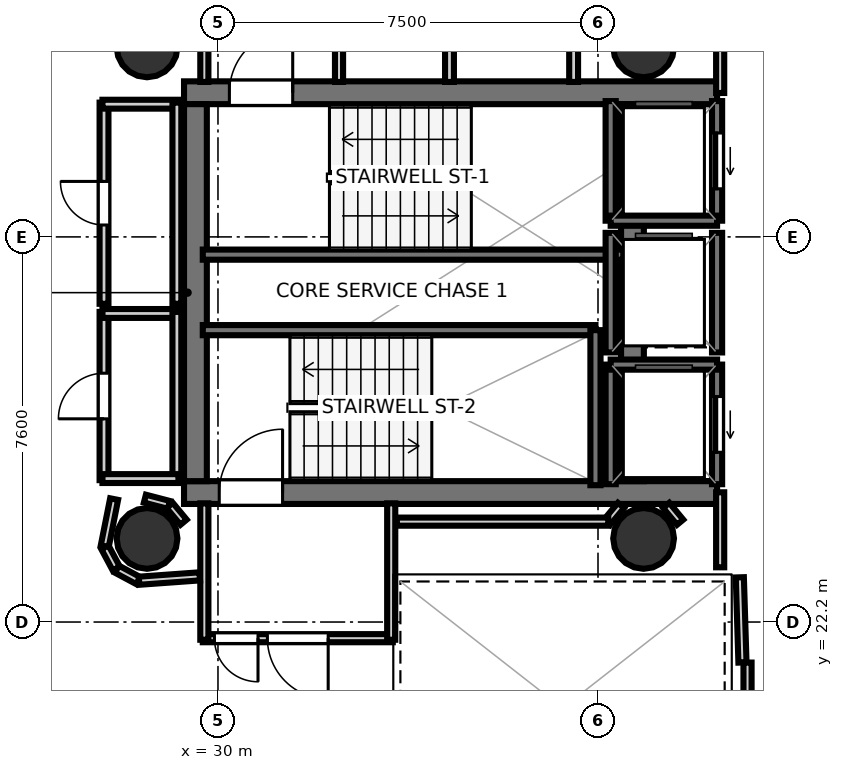
"""IFC4 building model, lengths in metres.
Left out: names, types, materials, properties, quantities, classifications, styles, units other than length and angle.
Written with IfcOpenShell. Run it as: python <this file> out.ifc"""

import sys

from ifc_helpers import new_model, si_unit, direction, frame, frame_2d, origin, origin_2d, place, context, subcontext, project, spatial, rectangle, hollow_circle, extrude, element, fill, save


model = new_model("IFC4")
c1 = context("Model", 3, precision=1e-05, world=origin(), true_north=direction((0.0, 1.0)))
c2 = subcontext(c1, "Body", "Model", "MODEL_VIEW")
j1 = project(units=[si_unit("LENGTHUNIT", "METRE"), si_unit("PLANEANGLEUNIT", "RADIAN")], contexts=[c1])
p1 = place(None, origin())
s1 = spatial("IfcSite", under=j1, at=p1, CompositionType="ELEMENT")
p2 = place(p1, origin())
s2 = spatial("IfcBuilding", under=s1, at=p2, CompositionType="ELEMENT")
p3 = place(p2, frame((0.0, 0.0, 189.2)))
s3 = spatial("IfcBuildingStorey", under=s2, at=p3, CompositionType="ELEMENT", Elevation=189.2)
p4 = place(p3, frame((29.33, 32.645, 0.0), z_axis=(0.0, 0.0, 1.0), x_axis=(1.0, 0.0, 0.0)))
e1 = element("IfcWall", 1, at=p4, inside=s3, PredefinedType="SHEAR", context=c2, shape_type="SweptSolid", body=[
    extrude(rectangle(XDim=10.52, YDim=0.45, at=frame_2d((5.26, 0.0))), origin(), (0.0, 0.0, 1.0), 3.52),
])
p5 = place(p4, frame((0.895, 0.0, 0.0)))
e2 = element("IfcOpeningElement", 2, at=p5, cuts=e1, PredefinedType="OPENING", context=c2, shape_type="SweptSolid", body=[
    extrude(rectangle(XDim=1.25, YDim=2.15, at=frame_2d((0.625, 1.075))), frame((0.0, 0.235, 0.0), z_axis=(0.0, -1.0, 0.0), x_axis=(1.0, 0.0, 0.0)), (0.0, 0.0, 1.0), 0.47),
])
p6 = place(p3, frame((29.33, 24.755, 0.0), z_axis=(0.0, 0.0, 1.0), x_axis=(1.0, 0.0, 0.0)))
e3 = element("IfcWall", 3, at=p6, inside=s3, PredefinedType="SHEAR", context=c2, shape_type="SweptSolid", body=[
    extrude(rectangle(XDim=10.52, YDim=0.45, at=frame_2d((5.26, 0.0))), origin(), (0.0, 0.0, 1.0), 3.52),
])
p7 = place(p6, frame((0.695, 0.0, 0.0)))
e4 = element("IfcOpeningElement", 4, at=p7, cuts=e3, PredefinedType="OPENING", context=c2, shape_type="SweptSolid", body=[
    extrude(rectangle(XDim=1.25, YDim=2.15, at=frame_2d((0.625, 1.075))), frame((0.0, 0.235, 0.0), z_axis=(0.0, -1.0, 0.0), x_axis=(1.0, 0.0, 0.0)), (0.0, 0.0, 1.0), 0.47),
])
for number, where, z_axis, x_axis in (
    (5, (29.555, 24.98, 0.0), (0.0, 0.0, 1.0), (0.0, 1.0, 0.0)),
    (6, (38.18, 24.98, 0.0), (0.0, 0.0, 1.0), (0.0, 1.0, 0.0)),
):
    element("IfcWall", number, at=place(p3, frame(where, z_axis=z_axis, x_axis=x_axis)), inside=s3, PredefinedType="SHEAR", context=c2, shape_type="SweptSolid", body=[
        extrude(rectangle(XDim=7.44, YDim=0.45, at=frame_2d((3.72, 0.0))), origin(), (0.0, 0.0, 1.0), 3.52),
    ])
for number, where, z_axis, x_axis in (
    (7, (28.6, 33.55, 0.0), (0.0, 0.0, 1.0), (1.0, 0.0, 0.0)),
    (8, (28.6, 23.85, 0.0), (0.0, 0.0, 1.0), (1.0, 0.0, 0.0)),
    (9, (38.4, 33.55, 0.0), (0.0, 0.0, 1.0), (1.0, 0.0, 0.0)),
    (10, (38.4, 23.85, 0.0), (0.0, 0.0, 1.0), (1.0, 0.0, 0.0)),
):
    element("IfcColumn", number, at=place(p3, frame(where, z_axis=z_axis, x_axis=x_axis)), inside=s3, PredefinedType="COLUMN", context=c2, shape_type="SweptSolid", body=[
        extrude(hollow_circle(Radius=0.6, WallThickness=0.03, at=origin_2d()), origin(), (0.0, 0.0, 1.0), 3.7),
    ])
p8 = place(p3, frame((29.7, 29.45, 0.0), z_axis=(0.0, 0.0, 1.0), x_axis=(1.0, 0.0, 0.0)))
e11 = element("IfcWall", 11, at=p8, inside=s3, PredefinedType="SOLIDWALL", context=c2, shape_type="SweptSolid", body=[
    extrude(rectangle(XDim=8.3, YDim=0.2, at=frame_2d((4.15, 0.0))), origin(), (0.0, 0.0, 1.0), 3.52),
])
p9 = place(p3, frame((29.7, 27.96, 0.0), z_axis=(0.0, 0.0, 1.0), x_axis=(1.0, 0.0, 0.0)))
e12 = element("IfcWall", 12, at=p9, inside=s3, PredefinedType="SOLIDWALL", context=c2, shape_type="SweptSolid", body=[
    extrude(rectangle(XDim=7.75, YDim=0.2, at=frame_2d((3.875, 0.0))), origin(), (0.0, 0.0, 1.0), 3.52),
])
p10 = place(p3, frame((37.45, 24.9, 0.0), z_axis=(0.0, 0.0, 1.0), x_axis=(0.0, 1.0, 0.0)))
e13 = element("IfcWall", 13, at=p10, inside=s3, PredefinedType="SOLIDWALL", context=c2, shape_type="SweptSolid", body=[
    extrude(rectangle(XDim=3.06, YDim=0.2, at=frame_2d((1.53, 0.0))), origin(), (0.0, 0.0, 1.0), 3.52),
])
p11 = place(p3, frame((39.85, 30.12, 0.0), z_axis=(0.0, 0.0, 1.0), x_axis=(0.0, 1.0, 0.0)))
e14 = element("IfcWall", 14, at=p11, inside=s3, PredefinedType="SOLIDWALL", context=c2, shape_type="SweptSolid", body=[
    extrude(rectangle(XDim=2.36, YDim=0.2, at=frame_2d((1.18, 0.0))), origin(), (0.0, 0.0, 1.0), 3.52),
])
p12 = place(p11, frame((0.63, 0.0, 0.0)))
e15 = element("IfcOpeningElement", 15, at=p12, cuts=e14, PredefinedType="OPENING", context=c2, shape_type="SweptSolid", body=[
    extrude(rectangle(XDim=1.1, YDim=2.15, at=frame_2d((0.55, 1.075))), frame((0.0, 0.11, 0.0), z_axis=(0.0, -1.0, 0.0), x_axis=(1.0, 0.0, 0.0)), (0.0, 0.0, 1.0), 0.22),
])
p13 = place(p3, frame((37.75, 30.12, 0.0), z_axis=(0.0, 0.0, 1.0), x_axis=(0.0, 1.0, 0.0)))
e16 = element("IfcWall", 16, at=p13, inside=s3, PredefinedType="SOLIDWALL", context=c2, shape_type="SweptSolid", body=[
    extrude(rectangle(XDim=2.36, YDim=0.2, at=frame_2d((1.18, 0.0))), origin(), (0.0, 0.0, 1.0), 3.52),
])
p14 = place(p3, frame((37.75, 30.12, 0.0), z_axis=(0.0, 0.0, 1.0), x_axis=(1.0, 0.0, 0.0)))
e17 = element("IfcWall", 17, at=p14, inside=s3, PredefinedType="SOLIDWALL", context=c2, shape_type="SweptSolid", body=[
    extrude(rectangle(XDim=2.1, YDim=0.2, at=frame_2d((1.05, 0.0))), origin(), (0.0, 0.0, 1.0), 3.52),
])
p15 = place(p3, frame((39.85, 24.92, 0.0), z_axis=(0.0, 0.0, 1.0), x_axis=(0.0, 1.0, 0.0)))
e18 = element("IfcWall", 18, at=p15, inside=s3, PredefinedType="SOLIDWALL", context=c2, shape_type="SweptSolid", body=[
    extrude(rectangle(XDim=2.36, YDim=0.2, at=frame_2d((1.18, 0.0))), origin(), (0.0, 0.0, 1.0), 3.52),
])
p16 = place(p15, frame((0.63, 0.0, 0.0)))
e19 = element("IfcOpeningElement", 19, at=p16, cuts=e18, PredefinedType="OPENING", context=c2, shape_type="SweptSolid", body=[
    extrude(rectangle(XDim=1.1, YDim=2.15, at=frame_2d((0.55, 1.075))), frame((0.0, 0.11, 0.0), z_axis=(0.0, -1.0, 0.0), x_axis=(1.0, 0.0, 0.0)), (0.0, 0.0, 1.0), 0.22),
])
p17 = place(p3, frame((37.75, 24.92, 0.0), z_axis=(0.0, 0.0, 1.0), x_axis=(0.0, 1.0, 0.0)))
e20 = element("IfcWall", 20, at=p17, inside=s3, PredefinedType="SOLIDWALL", context=c2, shape_type="SweptSolid", body=[
    extrude(rectangle(XDim=2.36, YDim=0.2, at=frame_2d((1.18, 0.0))), origin(), (0.0, 0.0, 1.0), 3.52),
])
p18 = place(p3, frame((37.75, 27.28, 0.0), z_axis=(0.0, 0.0, 1.0), x_axis=(1.0, 0.0, 0.0)))
e21 = element("IfcWall", 21, at=p18, inside=s3, PredefinedType="SOLIDWALL", context=c2, shape_type="SweptSolid", body=[
    extrude(rectangle(XDim=2.1, YDim=0.2, at=frame_2d((1.05, 0.0))), origin(), (0.0, 0.0, 1.0), 3.52),
])
for number, where, z_axis, x_axis in (
    (22, (39.85, 27.52, 0.0), (0.0, 0.0, 1.0), (0.0, 1.0, 0.0)),
    (23, (37.75, 27.52, 0.0), (0.0, 0.0, 1.0), (0.0, 1.0, 0.0)),
):
    element("IfcWall", number, at=place(p3, frame(where, z_axis=z_axis, x_axis=x_axis)), inside=s3, PredefinedType="SOLIDWALL", context=c2, shape_type="SweptSolid", body=[
        extrude(rectangle(XDim=2.36, YDim=0.2, at=frame_2d((1.18, 0.0))), origin(), (0.0, 0.0, 1.0), 3.52),
    ])
p19 = place(p3, frame((29.731, 32.858, 0.0), z_axis=(0.0, 0.0, 1.0), x_axis=(0.0, 1.0, 0.0)))
e24 = element("IfcWall", 24, at=p19, inside=s3, PredefinedType="PARTITIONING", context=c2, shape_type="SweptSolid", body=[
    extrude(rectangle(XDim=2.662, YDim=0.16, at=frame_2d((1.331, 0.0))), origin(), (0.0, 0.0, 1.0), 2.84),
])
p20 = place(p19, frame((1.478, 0.0, 0.0)))
e25 = element("IfcOpeningElement", 25, at=p20, cuts=e24, PredefinedType="OPENING", context=c2, shape_type="SweptSolid", body=[
    extrude(rectangle(XDim=0.86, YDim=2.05, at=frame_2d((0.43, 1.025))), frame((0.0, 0.09, 0.0), z_axis=(0.0, -1.0, 0.0), x_axis=(1.0, 0.0, 0.0)), (0.0, 0.0, 1.0), 0.18),
])
p21 = place(p3, frame((32.389, 35.52, 0.0), z_axis=(0.0, 0.0, 1.0), x_axis=(0.0, -1.0, 0.0)))
e26 = element("IfcWall", 26, at=p21, inside=s3, PredefinedType="PARTITIONING", context=c2, shape_type="SweptSolid", body=[
    extrude(rectangle(XDim=2.662, YDim=0.16, at=frame_2d((1.331, 0.0))), origin(), (0.0, 0.0, 1.0), 2.84),
])
p22 = place(p3, frame((33.45, 21.881, 0.0), z_axis=(0.0, 0.0, 1.0), x_axis=(-1.0, 0.0, 0.0)))
e27 = element("IfcWall", 27, at=p22, inside=s3, PredefinedType="PARTITIONING", context=c2, shape_type="SweptSolid", body=[
    extrude(rectangle(XDim=3.75, YDim=0.16, at=frame_2d((1.875, 0.0))), origin(), (0.0, 0.0, 1.0), 2.84),
])
p23 = place(p22, frame((1.275, 0.0, 0.0)))
e28 = element("IfcOpeningElement", 28, at=p23, cuts=e27, PredefinedType="OPENING", context=c2, shape_type="SweptSolid", body=[
    extrude(rectangle(XDim=1.2, YDim=2.15, at=frame_2d((0.6, 1.075))), frame((0.0, 0.09, 0.0), z_axis=(0.0, -1.0, 0.0), x_axis=(1.0, 0.0, 0.0)), (0.0, 0.0, 1.0), 0.18),
])
p24 = place(p22, frame((2.66, 0.0, 0.0)))
e29 = element("IfcOpeningElement", 29, at=p24, cuts=e27, PredefinedType="OPENING", context=c2, shape_type="SweptSolid", body=[
    extrude(rectangle(XDim=0.86, YDim=2.05, at=frame_2d((0.43, 1.025))), frame((0.0, 0.09, 0.0), z_axis=(0.0, -1.0, 0.0), x_axis=(1.0, 0.0, 0.0)), (0.0, 0.0, 1.0), 0.18),
])
for number, where, z_axis, x_axis in (
    (30, (29.731, 21.85, 0.0), (0.0, 0.0, 1.0), (0.0, 1.0, 0.0)),
    (31, (33.419, 24.542, 0.0), (0.0, 0.0, 1.0), (0.0, -1.0, 0.0)),
):
    element("IfcWall", number, at=place(p3, frame(where, z_axis=z_axis, x_axis=x_axis)), inside=s3, PredefinedType="PARTITIONING", context=c2, shape_type="SweptSolid", body=[
        extrude(rectangle(XDim=2.692, YDim=0.16, at=frame_2d((1.346, 0.0))), origin(), (0.0, 0.0, 1.0), 2.84),
    ])
p25 = place(p3, frame((40.351, 21.401, 0.0), z_axis=(0.0, 0.0, 1.0), x_axis=(-0.031058045979, 0.999517582527, 0.0)))
e32 = element("IfcWall", 32, at=p25, inside=s3, PredefinedType="PARTITIONING", context=c2, shape_type="SweptSolid", body=[
    extrude(rectangle(XDim=1.682, YDim=0.16, at=frame_2d((0.841, 0.0))), origin(), (0.0, 0.0, 1.0), 2.84),
])
p26 = place(p3, frame((39.911, 23.28, 0.0), z_axis=(0.0, 0.0, 1.0), x_axis=(0.0, 1.0, 0.0)))
e33 = element("IfcWall", 33, at=p26, inside=s3, PredefinedType="PARTITIONING", context=c2, shape_type="SweptSolid", body=[
    extrude(rectangle(XDim=1.48, YDim=0.16, at=frame_2d((0.74, 0.0))), origin(), (0.0, 0.0, 1.0), 2.84),
])
p27 = place(p3, frame((39.911, 32.64, 0.0), z_axis=(0.0, 0.0, 1.0), x_axis=(0.0, 1.0, 0.0)))
e34 = element("IfcWall", 34, at=p27, inside=s3, PredefinedType="PARTITIONING", context=c2, shape_type="SweptSolid", body=[
    extrude(rectangle(XDim=2.604, YDim=0.16, at=frame_2d((1.302, 0.0))), origin(), (0.0, 0.0, 1.0), 2.84),
])
p28 = place(p3, frame((40.451, 18.08, 0.0), z_axis=(0.0, 0.0, 1.0), x_axis=(0.0, 1.0, 0.0)))
e35 = element("IfcWall", 35, at=p28, inside=s3, PredefinedType="PARTITIONING", context=c2, shape_type="SweptSolid", body=[
    extrude(rectangle(XDim=3.32, YDim=0.16, at=frame_2d((1.66, 0.0))), origin(), (0.0, 0.0, 1.0), 2.84),
])
for number, where, z_axis, x_axis in (
    (36, (34.569, 35.48, 0.0), (0.0, 0.0, 1.0), (0.0, -1.0, 0.0)),
    (37, (37.019, 35.48, 0.0), (0.0, 0.0, 1.0), (0.0, -1.0, 0.0)),
):
    element("IfcWall", number, at=place(p3, frame(where, z_axis=z_axis, x_axis=x_axis)), inside=s3, PredefinedType="PLUMBINGWALL", context=c2, shape_type="SweptSolid", body=[
        extrude(rectangle(XDim=2.622, YDim=0.175, at=frame_2d((1.311, 0.0))), origin(), (0.0, 0.0, 1.0), 2.84),
    ])
p29 = place(p3, frame((27.751, 25.0, 0.0), z_axis=(0.0, 0.0, 1.0), x_axis=(0.0, 1.0, 0.0)))
e38 = element("IfcWall", 38, at=p29, inside=s3, PredefinedType="PLUMBINGWALL", context=c2, shape_type="SweptSolid", body=[
    extrude(rectangle(XDim=3.32, YDim=0.175, at=frame_2d((1.66, 0.0))), origin(), (0.0, 0.0, 1.0), 2.84),
])
p30 = place(p29, frame((1.21, 0.0, 0.0)))
e39 = element("IfcOpeningElement", 39, at=p30, cuts=e38, PredefinedType="OPENING", context=c2, shape_type="SweptSolid", body=[
    extrude(rectangle(XDim=0.9, YDim=2.1, at=frame_2d((0.45, 1.05))), frame((0.0, 0.097, 0.0), z_axis=(0.0, -1.0, 0.0), x_axis=(1.0, 0.0, 0.0)), (0.0, 0.0, 1.0), 0.195),
])
p31 = place(p3, frame((27.72, 28.289, 0.0), z_axis=(0.0, 0.0, 1.0), x_axis=(1.0, 0.0, 0.0)))
e40 = element("IfcWall", 40, at=p31, inside=s3, PredefinedType="PLUMBINGWALL", context=c2, shape_type="SweptSolid", body=[
    extrude(rectangle(XDim=1.5, YDim=0.175, at=frame_2d((0.75, 0.0))), origin(), (0.0, 0.0, 1.0), 2.84),
])
p32 = place(p3, frame((29.189, 28.32, 0.0), z_axis=(0.0, 0.0, 1.0), x_axis=(0.0, -1.0, 0.0)))
e41 = element("IfcWall", 41, at=p32, inside=s3, PredefinedType="PLUMBINGWALL", context=c2, shape_type="SweptSolid", body=[
    extrude(rectangle(XDim=3.32, YDim=0.175, at=frame_2d((1.66, 0.0))), origin(), (0.0, 0.0, 1.0), 2.84),
])
p33 = place(p3, frame((29.22, 25.031, 0.0), z_axis=(0.0, 0.0, 1.0), x_axis=(-1.0, 0.0, 0.0)))
e42 = element("IfcWall", 42, at=p33, inside=s3, PredefinedType="PLUMBINGWALL", context=c2, shape_type="SweptSolid", body=[
    extrude(rectangle(XDim=1.5, YDim=0.175, at=frame_2d((0.75, 0.0))), origin(), (0.0, 0.0, 1.0), 2.84),
])
p34 = place(p3, frame((27.751, 28.48, 0.0), z_axis=(0.0, 0.0, 1.0), x_axis=(0.0, 1.0, 0.0)))
e43 = element("IfcWall", 43, at=p34, inside=s3, PredefinedType="PLUMBINGWALL", context=c2, shape_type="SweptSolid", body=[
    extrude(rectangle(XDim=3.97, YDim=0.175, at=frame_2d((1.985, 0.0))), origin(), (0.0, 0.0, 1.0), 2.84),
])
p35 = place(p34, frame((1.555, 0.0, 0.0)))
e44 = element("IfcOpeningElement", 44, at=p35, cuts=e43, PredefinedType="OPENING", context=c2, shape_type="SweptSolid", body=[
    extrude(rectangle(XDim=0.86, YDim=2.05, at=frame_2d((0.43, 1.025))), frame((0.0, 0.097, 0.0), z_axis=(0.0, -1.0, 0.0), x_axis=(1.0, 0.0, 0.0)), (0.0, 0.0, 1.0), 0.195),
])
p36 = place(p3, frame((27.72, 32.419, 0.0), z_axis=(0.0, 0.0, 1.0), x_axis=(1.0, 0.0, 0.0)))
e45 = element("IfcWall", 45, at=p36, inside=s3, PredefinedType="PLUMBINGWALL", context=c2, shape_type="SweptSolid", body=[
    extrude(rectangle(XDim=1.5, YDim=0.175, at=frame_2d((0.75, 0.0))), origin(), (0.0, 0.0, 1.0), 2.84),
])
p37 = place(p3, frame((29.189, 32.45, 0.0), z_axis=(0.0, 0.0, 1.0), x_axis=(0.0, -1.0, 0.0)))
e46 = element("IfcWall", 46, at=p37, inside=s3, PredefinedType="PLUMBINGWALL", context=c2, shape_type="SweptSolid", body=[
    extrude(rectangle(XDim=3.97, YDim=0.175, at=frame_2d((1.985, 0.0))), origin(), (0.0, 0.0, 1.0), 2.84),
])
p38 = place(p3, frame((29.321, 24.17, 0.0), z_axis=(0.0, 0.0, 1.0), x_axis=(-0.638008265708, 0.770029514296, 0.0)))
e47 = element("IfcWall", 47, at=p38, inside=s3, PredefinedType="PARTITIONING", context=c2, shape_type="SweptSolid", body=[
    extrude(rectangle(XDim=0.431, YDim=0.16, at=frame_2d((0.215, 0.0))), origin(), (0.0, 0.0, 1.0), 2.84),
])
p39 = place(p3, frame((29.03, 24.512, 0.0), z_axis=(0.0, 0.0, 1.0), x_axis=(-0.967681003213, 0.252177469296, 0.0)))
e48 = element("IfcWall", 48, at=p39, inside=s3, PredefinedType="PARTITIONING", context=c2, shape_type="SweptSolid", body=[
    extrude(rectangle(XDim=0.488, YDim=0.16, at=frame_2d((0.244, 0.0))), origin(), (0.0, 0.0, 1.0), 2.84),
])
for number, where, z_axis, x_axis in (
    (49, (39.121, 24.17, 0.0), (0.0, 0.0, 1.0), (-0.638, 0.77, 0.0)),
    (50, (37.954, 24.502, 0.0), (0.0, 0.0, 1.0), (-0.638, -0.77, 0.0)),
):
    element("IfcWall", number, at=place(p3, frame(where, z_axis=z_axis, x_axis=x_axis)), inside=s3, PredefinedType="PARTITIONING", context=c2, shape_type="SweptSolid", body=[
        extrude(rectangle(XDim=0.431, YDim=0.16, at=frame_2d((0.215, 0.0))), origin(), (0.0, 0.0, 1.0), 2.84),
    ])
p40 = place(p3, frame((37.703, 24.181, 0.0), z_axis=(0.0, 0.0, 1.0), x_axis=(-1.0, 0.0, 0.0)))
e51 = element("IfcWall", 51, at=p40, inside=s3, PredefinedType="PARTITIONING", context=c2, shape_type="SweptSolid", body=[
    extrude(rectangle(XDim=4.173, YDim=0.16, at=frame_2d((2.086, 0.0))), origin(), (0.0, 0.0, 1.0), 2.84),
])
p41 = place(p3, frame((27.95, 24.626, 0.0), z_axis=(0.0, 0.0, 1.0), x_axis=(-0.195125950178, -0.980778192848, 0.0)))
e52 = element("IfcWall", 52, at=p41, inside=s3, PredefinedType="PARTITIONING", context=c2, shape_type="SweptSolid", body=[
    extrude(rectangle(XDim=0.948, YDim=0.16, at=frame_2d((0.474, 0.0))), origin(), (0.0, 0.0, 1.0), 2.84),
])
for number, where, z_axis, x_axis in (
    (53, (27.768, 23.675, 0.0), (0.0, 0.0, 1.0), (0.472, -0.882, 0.0)),
    (54, (28.006, 23.243, 0.0), (0.0, 0.0, 1.0), (0.882, -0.472, 0.0)),
):
    element("IfcWall", number, at=place(p3, frame(where, z_axis=z_axis, x_axis=x_axis)), inside=s3, PredefinedType="PARTITIONING", context=c2, shape_type="SweptSolid", body=[
        extrude(rectangle(XDim=0.476, YDim=0.16, at=frame_2d((0.238, 0.0))), origin(), (0.0, 0.0, 1.0), 2.84),
    ])
p42 = place(p3, frame((28.442, 23.015, 0.0), z_axis=(0.0, 0.0, 1.0), x_axis=(0.99740683837, 0.07196942943, 0.0)))
e55 = element("IfcWall", 55, at=p42, inside=s3, PredefinedType="PARTITIONING", context=c2, shape_type="SweptSolid", body=[
    extrude(rectangle(XDim=1.201, YDim=0.16, at=frame_2d((0.601, 0.0))), origin(), (0.0, 0.0, 1.0), 2.84),
])
p43 = place(p5, origin())
e56 = element("IfcDoor", 56, at=p43, inside=s3, OperationType="SINGLE_SWING_RIGHT", PredefinedType="DOOR", context=c2, shape_type="SweptSolid", body=[
    extrude(rectangle(XDim=1.25, YDim=2.15, at=frame_2d((0.625, 1.075))), frame((0.0, 0.025, 0.0), z_axis=(0.0, -1.0, 0.0), x_axis=(1.0, 0.0, 0.0)), (0.0, 0.0, 1.0), 0.05),
])
fill(e2, e56)
p44 = place(p7, origin())
e57 = element("IfcDoor", 57, at=p44, inside=s3, OperationType="SINGLE_SWING_RIGHT", PredefinedType="DOOR", context=c2, shape_type="SweptSolid", body=[
    extrude(rectangle(XDim=1.25, YDim=2.15, at=frame_2d((0.625, 1.075))), frame((0.0, 0.025, 0.0), z_axis=(0.0, -1.0, 0.0), x_axis=(1.0, 0.0, 0.0)), (0.0, 0.0, 1.0), 0.05),
])
fill(e4, e57)
p45 = place(p12, origin())
e58 = element("IfcDoor", 58, at=p45, inside=s3, OperationType="SLIDING_TO_LEFT", PredefinedType="DOOR", context=c2, shape_type="SweptSolid", body=[
    extrude(rectangle(XDim=1.1, YDim=2.15, at=frame_2d((0.55, 1.075))), frame((0.0, 0.025, 0.0), z_axis=(0.0, -1.0, 0.0), x_axis=(1.0, 0.0, 0.0)), (0.0, 0.0, 1.0), 0.05),
])
fill(e15, e58)
p46 = place(p16, origin())
e59 = element("IfcDoor", 59, at=p46, inside=s3, OperationType="SLIDING_TO_LEFT", PredefinedType="DOOR", context=c2, shape_type="SweptSolid", body=[
    extrude(rectangle(XDim=1.1, YDim=2.15, at=frame_2d((0.55, 1.075))), frame((0.0, 0.025, 0.0), z_axis=(0.0, -1.0, 0.0), x_axis=(1.0, 0.0, 0.0)), (0.0, 0.0, 1.0), 0.05),
])
fill(e19, e59)
p47 = place(p23, origin())
e60 = element("IfcDoor", 60, at=p47, inside=s3, OperationType="SINGLE_SWING_LEFT", PredefinedType="DOOR", context=c2, shape_type="SweptSolid", body=[
    extrude(rectangle(XDim=1.2, YDim=2.15, at=frame_2d((0.6, 1.075))), frame((0.0, 0.025, 0.0), z_axis=(0.0, -1.0, 0.0), x_axis=(1.0, 0.0, 0.0)), (0.0, 0.0, 1.0), 0.05),
])
fill(e28, e60)
p48 = place(p30, origin())
e61 = element("IfcDoor", 61, at=p48, inside=s3, OperationType="SINGLE_SWING_LEFT", PredefinedType="DOOR", context=c2, shape_type="SweptSolid", body=[
    extrude(rectangle(XDim=0.9, YDim=2.1, at=frame_2d((0.45, 1.05))), frame((0.0, 0.025, 0.0), z_axis=(0.0, -1.0, 0.0), x_axis=(1.0, 0.0, 0.0)), (0.0, 0.0, 1.0), 0.05),
])
fill(e39, e61)
p49 = place(p35, origin())
e62 = element("IfcDoor", 62, at=p49, inside=s3, OperationType="SINGLE_SWING_RIGHT", PredefinedType="DOOR", context=c2, shape_type="SweptSolid", body=[
    extrude(rectangle(XDim=0.86, YDim=2.05, at=frame_2d((0.43, 1.025))), frame((0.0, 0.025, 0.0), z_axis=(0.0, -1.0, 0.0), x_axis=(1.0, 0.0, 0.0)), (0.0, 0.0, 1.0), 0.05),
])
fill(e44, e62)
p50 = place(p24, origin())
e63 = element("IfcDoor", 63, at=p50, inside=s3, OperationType="SINGLE_SWING_LEFT", PredefinedType="DOOR", context=c2, shape_type="SweptSolid", body=[
    extrude(rectangle(XDim=0.86, YDim=2.05, at=frame_2d((0.43, 1.025))), frame((0.0, 0.025, 0.0), z_axis=(0.0, -1.0, 0.0), x_axis=(1.0, 0.0, 0.0)), (0.0, 0.0, 1.0), 0.05),
])
fill(e29, e63)
save(model, sys.argv[1])
